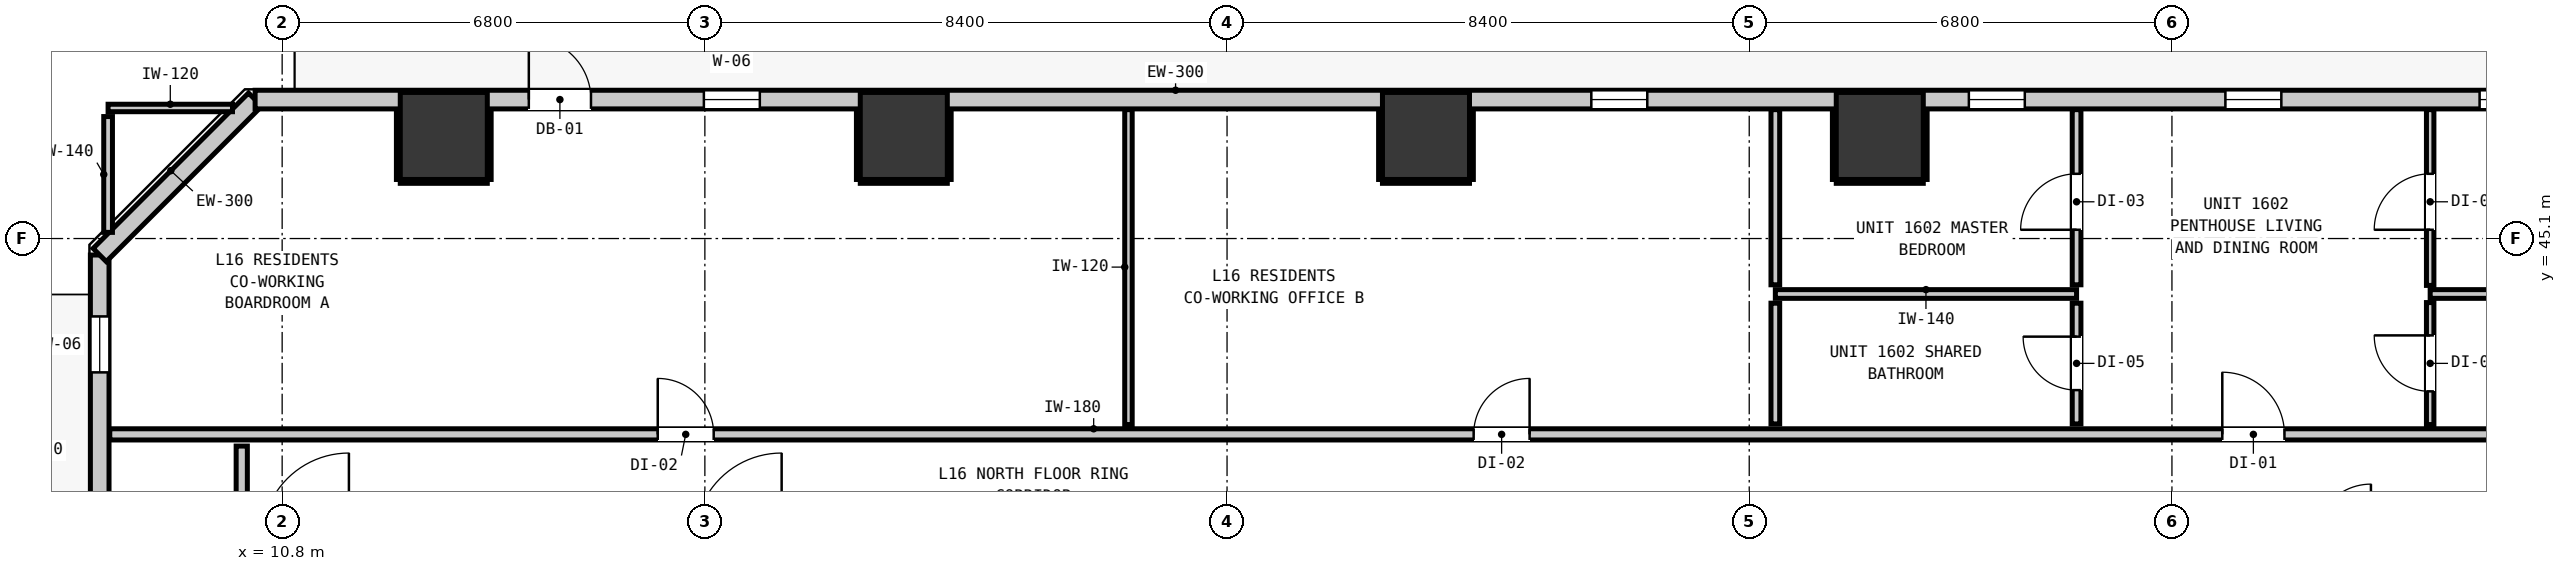
"""IFC4 building model, lengths in metres.
Left out: names, types, materials, properties, quantities, classifications, styles, units other than length and angle.
Written with IfcOpenShell. Run it as: python <this file> out.ifc"""

import sys

from ifc_helpers import new_model, si_unit, direction, frame, frame_2d, origin, origin_2d, place, context, subcontext, project, spatial, rectangle, extrude, element, fill, save


model = new_model("IFC4")
c1 = context("Model", 3, precision=1e-05, world=origin(), true_north=direction((0.0, 1.0)))
c2 = subcontext(c1, "Body", "Model", "MODEL_VIEW")
j1 = project(units=[si_unit("LENGTHUNIT", "METRE"), si_unit("PLANEANGLEUNIT", "RADIAN")], contexts=[c1])
p1 = place(None, origin())
s1 = spatial("IfcSite", under=j1, at=p1, CompositionType="ELEMENT")
p2 = place(p1, origin())
s2 = spatial("IfcBuilding", under=s1, at=p2, CompositionType="ELEMENT")
p3 = place(p2, frame((0.0, 0.0, 58.52)))
s3 = spatial("IfcBuildingStorey", under=s2, at=p3, CompositionType="ELEMENT", Elevation=58.52)
for number, where, z_axis, x_axis in (
    (1, (13.4, 46.75, 0.0), (0.0, 0.0, 1.0), (1.0, 0.0, 0.0)),
    (2, (20.8, 46.75, 0.0), (0.0, 0.0, 1.0), (1.0, 0.0, 0.0)),
    (3, (29.2, 46.75, 0.0), (0.0, 0.0, 1.0), (1.0, 0.0, 0.0)),
    (4, (36.5, 46.75, 0.0), (0.0, 0.0, 1.0), (1.0, 0.0, 0.0)),
):
    element("IfcColumn", number, at=place(p3, frame(where, z_axis=z_axis, x_axis=x_axis)), inside=s3, PredefinedType="COLUMN", context=c2, shape_type="SweptSolid", body=[
        extrude(rectangle(XDim=1.4, YDim=1.4, at=origin_2d()), origin(), (0.0, 0.0, 1.0), 2.9),
    ])
p4 = place(p3, frame((7.865, 10.165, 0.0), z_axis=(0.0, 0.0, 1.0), x_axis=(0.0, 1.0, 0.0)))
e5 = element("IfcWall", 5, at=p4, inside=s3, PredefinedType="STANDARD", context=c2, shape_type="SweptSolid", body=[
    extrude(rectangle(XDim=34.67, YDim=0.3, at=frame_2d((17.335, 0.0))), origin(), (0.0, 0.0, 1.0), 2.9),
])
p5 = place(p4, frame((0.901, 0.0, 0.0)))
e6 = element("IfcOpeningElement", 6, at=p5, cuts=e5, PredefinedType="OPENING", context=c2, shape_type="SweptSolid", body=[
    extrude(rectangle(XDim=1.0, YDim=2.15, at=frame_2d((0.5, 1.075))), frame((0.0, 0.16, 0.0), z_axis=(0.0, -1.0, 0.0), x_axis=(1.0, 0.0, 0.0)), (0.0, 0.0, 1.0), 0.32),
])
p6 = place(p4, frame((32.782, 0.0, 0.85)))
e7 = element("IfcOpeningElement", 7, at=p6, cuts=e5, PredefinedType="OPENING", context=c2, shape_type="SweptSolid", body=[
    extrude(rectangle(XDim=0.9, YDim=1.5, at=frame_2d((0.45, 0.75))), frame((0.0, 0.16, 0.0), z_axis=(0.0, -1.0, 0.0), x_axis=(1.0, 0.0, 0.0)), (0.0, 0.0, 1.0), 0.32),
])
p7 = place(p3, frame((7.865, 44.835, 0.0), z_axis=(0.0, 0.0, 1.0), x_axis=(0.707106781187, 0.707106781187, 0.0)))
e8 = element("IfcWall", 8, at=p7, inside=s3, PredefinedType="STANDARD", context=c2, shape_type="SweptSolid", body=[
    extrude(rectangle(XDim=3.536, YDim=0.3, at=frame_2d((1.768, 0.0))), origin(), (0.0, 0.0, 1.0), 2.9),
])
p8 = place(p3, frame((10.365, 47.335, 0.0), z_axis=(0.0, 0.0, 1.0), x_axis=(1.0, 0.0, 0.0)))
e9 = element("IfcWall", 9, at=p8, inside=s3, PredefinedType="STANDARD", context=c2, shape_type="SweptSolid", body=[
    extrude(rectangle(XDim=37.47, YDim=0.3, at=frame_2d((18.735, 0.0))), origin(), (0.0, 0.0, 1.0), 2.9),
])
p9 = place(p8, frame((4.403, 0.0, 0.0)))
e10 = element("IfcOpeningElement", 10, at=p9, cuts=e9, PredefinedType="OPENING", context=c2, shape_type="SweptSolid", body=[
    extrude(rectangle(XDim=1.0, YDim=2.15, at=frame_2d((0.5, 1.075))), frame((0.0, 0.16, 0.0), z_axis=(0.0, -1.0, 0.0), x_axis=(1.0, 0.0, 0.0)), (0.0, 0.0, 1.0), 0.32),
])
p10 = place(p8, frame((7.219, 0.0, 0.85)))
e11 = element("IfcOpeningElement", 11, at=p10, cuts=e9, PredefinedType="OPENING", context=c2, shape_type="SweptSolid", body=[
    extrude(rectangle(XDim=0.9, YDim=1.5, at=frame_2d((0.45, 0.75))), frame((0.0, 0.16, 0.0), z_axis=(0.0, -1.0, 0.0), x_axis=(1.0, 0.0, 0.0)), (0.0, 0.0, 1.0), 0.32),
])
p11 = place(p8, frame((21.495, 0.0, 0.85)))
e12 = element("IfcOpeningElement", 12, at=p11, cuts=e9, PredefinedType="OPENING", context=c2, shape_type="SweptSolid", body=[
    extrude(rectangle(XDim=0.9, YDim=1.5, at=frame_2d((0.45, 0.75))), frame((0.0, 0.16, 0.0), z_axis=(0.0, -1.0, 0.0), x_axis=(1.0, 0.0, 0.0)), (0.0, 0.0, 1.0), 0.32),
])
p12 = place(p8, frame((31.695, 0.0, 0.85)))
e13 = element("IfcOpeningElement", 13, at=p12, cuts=e9, PredefinedType="OPENING", context=c2, shape_type="SweptSolid", body=[
    extrude(rectangle(XDim=0.9, YDim=1.5, at=frame_2d((0.45, 0.75))), frame((0.0, 0.16, 0.0), z_axis=(0.0, -1.0, 0.0), x_axis=(1.0, 0.0, 0.0)), (0.0, 0.0, 1.0), 0.32),
])
p13 = place(p8, frame((27.568, 0.0, 0.85)))
e14 = element("IfcOpeningElement", 14, at=p13, cuts=e9, PredefinedType="OPENING", context=c2, shape_type="SweptSolid", body=[
    extrude(rectangle(XDim=0.9, YDim=1.5, at=frame_2d((0.45, 0.75))), frame((0.0, 0.16, 0.0), z_axis=(0.0, -1.0, 0.0), x_axis=(1.0, 0.0, 0.0)), (0.0, 0.0, 1.0), 0.32),
])
p14 = place(p8, frame((35.784, 0.0, 0.85)))
e15 = element("IfcOpeningElement", 15, at=p14, cuts=e9, PredefinedType="OPENING", context=c2, shape_type="SweptSolid", body=[
    extrude(rectangle(XDim=0.9, YDim=1.5, at=frame_2d((0.45, 0.75))), frame((0.0, 0.16, 0.0), z_axis=(0.0, -1.0, 0.0), x_axis=(1.0, 0.0, 0.0)), (0.0, 0.0, 1.0), 0.32),
])
p15 = place(p3, frame((8.027, 41.95, 0.0), z_axis=(0.0, 0.0, 1.0), x_axis=(1.0, 0.0, 0.0)))
e16 = element("IfcWall", 16, at=p15, inside=s3, PredefinedType="PARTITIONING", context=c2, shape_type="SweptSolid", body=[
    extrude(rectangle(XDim=42.146, YDim=0.18, at=frame_2d((21.073, 0.0))), origin(), (0.0, 0.0, 1.0), 2.9),
])
p16 = place(p15, frame((8.815, 0.0, 0.0)))
e17 = element("IfcOpeningElement", 17, at=p16, cuts=e16, PredefinedType="OPENING", context=c2, shape_type="SweptSolid", body=[
    extrude(rectangle(XDim=0.9, YDim=2.1, at=frame_2d((0.45, 1.05))), frame((0.0, 0.1, 0.0), z_axis=(0.0, -1.0, 0.0), x_axis=(1.0, 0.0, 0.0)), (0.0, 0.0, 1.0), 0.2),
])
p17 = place(p15, frame((21.94, 0.0, 0.0)))
e18 = element("IfcOpeningElement", 18, at=p17, cuts=e16, PredefinedType="OPENING", context=c2, shape_type="SweptSolid", body=[
    extrude(rectangle(XDim=0.9, YDim=2.1, at=frame_2d((0.45, 1.05))), frame((0.0, 0.1, 0.0), z_axis=(0.0, -1.0, 0.0), x_axis=(1.0, 0.0, 0.0)), (0.0, 0.0, 1.0), 0.2),
])
p18 = place(p15, frame((33.983, 0.0, 0.0)))
e19 = element("IfcOpeningElement", 19, at=p18, cuts=e16, PredefinedType="OPENING", context=c2, shape_type="SweptSolid", body=[
    extrude(rectangle(XDim=1.0, YDim=2.15, at=frame_2d((0.5, 1.075))), frame((0.0, 0.1, 0.0), z_axis=(0.0, -1.0, 0.0), x_axis=(1.0, 0.0, 0.0)), (0.0, 0.0, 1.0), 0.2),
])
p19 = place(p3, frame((34.82, 44.208, 0.0), z_axis=(0.0, 0.0, 1.0), x_axis=(1.0, 0.0, 0.0)))
e20 = element("IfcWall", 20, at=p19, inside=s3, PredefinedType="PARTITIONING", context=c2, shape_type="SweptSolid", body=[
    extrude(rectangle(XDim=4.846, YDim=0.14, at=frame_2d((2.423, 0.0))), origin(), (0.0, 0.0, 1.0), 2.9),
])
p20 = place(p3, frame((45.354, 44.208, 0.0), z_axis=(0.0, 0.0, 1.0), x_axis=(1.0, 0.0, 0.0)))
e21 = element("IfcWall", 21, at=p20, inside=s3, PredefinedType="PARTITIONING", context=c2, shape_type="SweptSolid", body=[
    extrude(rectangle(XDim=4.819, YDim=0.14, at=frame_2d((2.41, 0.0))), origin(), (0.0, 0.0, 1.0), 2.9),
])
p21 = place(p3, frame((8.0, 47.2, 0.0), z_axis=(0.0, 0.0, 1.0), x_axis=(1.0, 0.0, 0.0)))
e22 = element("IfcWall", 22, at=p21, inside=s3, PredefinedType="PARTITIONING", context=c2, shape_type="SweptSolid", body=[
    extrude(rectangle(XDim=2.001, YDim=0.12, at=frame_2d((1.0, 0.0))), origin(), (0.0, 0.0, 1.0), 2.9),
])
p22 = place(p3, frame((10.15, 40.438, 0.0), z_axis=(0.0, 0.0, 1.0), x_axis=(0.0, 1.0, 0.0)))
e23 = element("IfcWall", 23, at=p22, inside=s3, PredefinedType="PARTITIONING", context=c2, shape_type="SweptSolid", body=[
    extrude(rectangle(XDim=1.324, YDim=0.18, at=frame_2d((0.662, 0.0))), origin(), (0.0, 0.0, 1.0), 2.9),
])
p23 = place(p3, frame((8.0, 45.199, 0.0), z_axis=(0.0, 0.0, 1.0), x_axis=(0.0, 1.0, 0.0)))
e24 = element("IfcWall", 24, at=p23, inside=s3, PredefinedType="PARTITIONING", context=c2, shape_type="SweptSolid", body=[
    extrude(rectangle(XDim=1.863, YDim=0.14, at=frame_2d((0.932, 0.0))), origin(), (0.0, 0.0, 1.0), 2.9),
])
p24 = place(p3, frame((34.82, 42.118, 0.0), z_axis=(0.0, 0.0, 1.0), x_axis=(0.0, 1.0, 0.0)))
e25 = element("IfcWall", 25, at=p24, inside=s3, PredefinedType="PARTITIONING", context=c2, shape_type="SweptSolid", body=[
    extrude(rectangle(XDim=1.942, YDim=0.14, at=frame_2d((0.971, 0.0))), origin(), (0.0, 0.0, 1.0), 2.9),
])
p25 = place(p3, frame((34.82, 44.356, 0.0), z_axis=(0.0, 0.0, 1.0), x_axis=(0.0, 1.0, 0.0)))
e26 = element("IfcWall", 26, at=p25, inside=s3, PredefinedType="PARTITIONING", context=c2, shape_type="SweptSolid", body=[
    extrude(rectangle(XDim=2.817, YDim=0.14, at=frame_2d((1.409, 0.0))), origin(), (0.0, 0.0, 1.0), 2.9),
])
p26 = place(p3, frame((39.666, 42.118, 0.0), z_axis=(0.0, 0.0, 1.0), x_axis=(0.0, 1.0, 0.0)))
e27 = element("IfcWall", 27, at=p26, inside=s3, PredefinedType="PARTITIONING", context=c2, shape_type="SweptSolid", body=[
    extrude(rectangle(XDim=1.942, YDim=0.14, at=frame_2d((0.971, 0.0))), origin(), (0.0, 0.0, 1.0), 2.9),
])
p27 = place(p26, frame((0.544, 0.0, 0.0)))
e28 = element("IfcOpeningElement", 28, at=p27, cuts=e27, PredefinedType="OPENING", context=c2, shape_type="SweptSolid", body=[
    extrude(rectangle(XDim=0.86, YDim=2.02, at=frame_2d((0.43, 1.01))), frame((0.0, 0.08, 0.0), z_axis=(0.0, -1.0, 0.0), x_axis=(1.0, 0.0, 0.0)), (0.0, 0.0, 1.0), 0.16),
])
p28 = place(p3, frame((39.666, 44.356, 0.0), z_axis=(0.0, 0.0, 1.0), x_axis=(0.0, 1.0, 0.0)))
e29 = element("IfcWall", 29, at=p28, inside=s3, PredefinedType="PARTITIONING", context=c2, shape_type="SweptSolid", body=[
    extrude(rectangle(XDim=2.817, YDim=0.14, at=frame_2d((1.409, 0.0))), origin(), (0.0, 0.0, 1.0), 2.9),
])
p29 = place(p28, frame((0.885, 0.0, 0.0)))
e30 = element("IfcOpeningElement", 30, at=p29, cuts=e29, PredefinedType="OPENING", context=c2, shape_type="SweptSolid", body=[
    extrude(rectangle(XDim=0.9, YDim=2.1, at=frame_2d((0.45, 1.05))), frame((0.0, 0.08, 0.0), z_axis=(0.0, -1.0, 0.0), x_axis=(1.0, 0.0, 0.0)), (0.0, 0.0, 1.0), 0.16),
])
p30 = place(p3, frame((24.414, 42.108, 0.0), z_axis=(0.0, 0.0, 1.0), x_axis=(0.0, 1.0, 0.0)))
e31 = element("IfcWall", 31, at=p30, inside=s3, PredefinedType="PARTITIONING", context=c2, shape_type="SweptSolid", body=[
    extrude(rectangle(XDim=5.065, YDim=0.12, at=frame_2d((2.533, 0.0))), origin(), (0.0, 0.0, 1.0), 2.9),
])
p31 = place(p3, frame((45.354, 42.108, 0.0), z_axis=(0.0, 0.0, 1.0), x_axis=(0.0, 1.0, 0.0)))
e32 = element("IfcWall", 32, at=p31, inside=s3, PredefinedType="PARTITIONING", context=c2, shape_type="SweptSolid", body=[
    extrude(rectangle(XDim=1.962, YDim=0.12, at=frame_2d((0.981, 0.0))), origin(), (0.0, 0.0, 1.0), 2.9),
])
p32 = place(p31, frame((0.534, 0.0, 0.0)))
e33 = element("IfcOpeningElement", 33, at=p32, cuts=e32, PredefinedType="OPENING", context=c2, shape_type="SweptSolid", body=[
    extrude(rectangle(XDim=0.9, YDim=2.1, at=frame_2d((0.45, 1.05))), frame((0.0, 0.07, 0.0), z_axis=(0.0, -1.0, 0.0), x_axis=(1.0, 0.0, 0.0)), (0.0, 0.0, 1.0), 0.14),
])
p33 = place(p3, frame((45.354, 44.346, 0.0), z_axis=(0.0, 0.0, 1.0), x_axis=(0.0, 1.0, 0.0)))
e34 = element("IfcWall", 34, at=p33, inside=s3, PredefinedType="PARTITIONING", context=c2, shape_type="SweptSolid", body=[
    extrude(rectangle(XDim=2.827, YDim=0.12, at=frame_2d((1.414, 0.0))), origin(), (0.0, 0.0, 1.0), 2.9),
])
p34 = place(p33, frame((0.895, 0.0, 0.0)))
e35 = element("IfcOpeningElement", 35, at=p34, cuts=e34, PredefinedType="OPENING", context=c2, shape_type="SweptSolid", body=[
    extrude(rectangle(XDim=0.9, YDim=2.1, at=frame_2d((0.45, 1.05))), frame((0.0, 0.07, 0.0), z_axis=(0.0, -1.0, 0.0), x_axis=(1.0, 0.0, 0.0)), (0.0, 0.0, 1.0), 0.14),
])
p35 = place(p3, frame((12.7, 46.018, 0.0), z_axis=(0.0, 0.0, 1.0), x_axis=(1.0, 0.0, 0.0)))
e36 = element("IfcWall", 36, at=p35, inside=s3, PredefinedType="PARTITIONING", context=c2, shape_type="SweptSolid", body=[
    extrude(rectangle(XDim=1.4, YDim=0.06, at=frame_2d((0.7, 0.0))), origin(), (0.0, 0.0, 1.0), 1.45),
])
for number, where, z_axis, x_axis in (
    (37, (12.668, 46.05, 0.0), (0.0, 0.0, 1.0), (0.0, 1.0, 0.0)),
    (38, (14.132, 46.05, 0.0), (0.0, 0.0, 1.0), (0.0, 1.0, 0.0)),
):
    element("IfcWall", number, at=place(p3, frame(where, z_axis=z_axis, x_axis=x_axis)), inside=s3, PredefinedType="PARTITIONING", context=c2, shape_type="SweptSolid", body=[
        extrude(rectangle(XDim=1.12, YDim=0.06, at=frame_2d((0.56, 0.0))), origin(), (0.0, 0.0, 1.0), 1.45),
    ])
p36 = place(p3, frame((20.1, 46.018, 0.0), z_axis=(0.0, 0.0, 1.0), x_axis=(1.0, 0.0, 0.0)))
e39 = element("IfcWall", 39, at=p36, inside=s3, PredefinedType="PARTITIONING", context=c2, shape_type="SweptSolid", body=[
    extrude(rectangle(XDim=1.4, YDim=0.06, at=frame_2d((0.7, 0.0))), origin(), (0.0, 0.0, 1.0), 1.45),
])
for number, where, z_axis, x_axis in (
    (40, (20.068, 46.05, 0.0), (0.0, 0.0, 1.0), (0.0, 1.0, 0.0)),
    (41, (21.532, 46.05, 0.0), (0.0, 0.0, 1.0), (0.0, 1.0, 0.0)),
):
    element("IfcWall", number, at=place(p3, frame(where, z_axis=z_axis, x_axis=x_axis)), inside=s3, PredefinedType="PARTITIONING", context=c2, shape_type="SweptSolid", body=[
        extrude(rectangle(XDim=1.12, YDim=0.06, at=frame_2d((0.56, 0.0))), origin(), (0.0, 0.0, 1.0), 1.45),
    ])
p37 = place(p3, frame((28.5, 46.018, 0.0), z_axis=(0.0, 0.0, 1.0), x_axis=(1.0, 0.0, 0.0)))
e42 = element("IfcWall", 42, at=p37, inside=s3, PredefinedType="PARTITIONING", context=c2, shape_type="SweptSolid", body=[
    extrude(rectangle(XDim=1.4, YDim=0.06, at=frame_2d((0.7, 0.0))), origin(), (0.0, 0.0, 1.0), 1.45),
])
for number, where, z_axis, x_axis in (
    (43, (28.468, 46.05, 0.0), (0.0, 0.0, 1.0), (0.0, 1.0, 0.0)),
    (44, (29.932, 46.05, 0.0), (0.0, 0.0, 1.0), (0.0, 1.0, 0.0)),
):
    element("IfcWall", number, at=place(p3, frame(where, z_axis=z_axis, x_axis=x_axis)), inside=s3, PredefinedType="PARTITIONING", context=c2, shape_type="SweptSolid", body=[
        extrude(rectangle(XDim=1.12, YDim=0.06, at=frame_2d((0.56, 0.0))), origin(), (0.0, 0.0, 1.0), 1.45),
    ])
p38 = place(p3, frame((35.8, 46.018, 0.0), z_axis=(0.0, 0.0, 1.0), x_axis=(1.0, 0.0, 0.0)))
e45 = element("IfcWall", 45, at=p38, inside=s3, PredefinedType="PARTITIONING", context=c2, shape_type="SweptSolid", body=[
    extrude(rectangle(XDim=1.4, YDim=0.06, at=frame_2d((0.7, 0.0))), origin(), (0.0, 0.0, 1.0), 1.45),
])
for number, where, z_axis, x_axis in (
    (46, (35.768, 46.05, 0.0), (0.0, 0.0, 1.0), (0.0, 1.0, 0.0)),
    (47, (37.232, 46.05, 0.0), (0.0, 0.0, 1.0), (0.0, 1.0, 0.0)),
):
    element("IfcWall", number, at=place(p3, frame(where, z_axis=z_axis, x_axis=x_axis)), inside=s3, PredefinedType="PARTITIONING", context=c2, shape_type="SweptSolid", body=[
        extrude(rectangle(XDim=1.12, YDim=0.06, at=frame_2d((0.56, 0.0))), origin(), (0.0, 0.0, 1.0), 1.45),
    ])
p39 = place(p9, origin())
e48 = element("IfcDoor", 48, at=p39, inside=s3, OperationType="SINGLE_SWING_LEFT", PredefinedType="DOOR", context=c2, shape_type="SweptSolid", body=[
    extrude(rectangle(XDim=1.0, YDim=2.15, at=frame_2d((0.5, 1.075))), frame((0.0, 0.025, 0.0), z_axis=(0.0, -1.0, 0.0), x_axis=(1.0, 0.0, 0.0)), (0.0, 0.0, 1.0), 0.05),
])
fill(e10, e48)
p40 = place(p6, origin())
e49 = element("IfcWindow", 49, at=p40, inside=s3, PartitioningType="SINGLE_PANEL", PredefinedType="WINDOW", context=c2, shape_type="SweptSolid", body=[
    extrude(rectangle(XDim=0.9, YDim=1.5, at=frame_2d((0.45, 0.75))), frame((0.0, 0.03, 0.0), z_axis=(0.0, -1.0, 0.0), x_axis=(1.0, 0.0, 0.0)), (0.0, 0.0, 1.0), 0.06),
])
fill(e7, e49)
p41 = place(p10, origin())
e50 = element("IfcWindow", 50, at=p41, inside=s3, PartitioningType="SINGLE_PANEL", PredefinedType="WINDOW", context=c2, shape_type="SweptSolid", body=[
    extrude(rectangle(XDim=0.9, YDim=1.5, at=frame_2d((0.45, 0.75))), frame((0.0, 0.03, 0.0), z_axis=(0.0, -1.0, 0.0), x_axis=(1.0, 0.0, 0.0)), (0.0, 0.0, 1.0), 0.06),
])
fill(e11, e50)
p42 = place(p11, origin())
e51 = element("IfcWindow", 51, at=p42, inside=s3, PartitioningType="SINGLE_PANEL", PredefinedType="WINDOW", context=c2, shape_type="SweptSolid", body=[
    extrude(rectangle(XDim=0.9, YDim=1.5, at=frame_2d((0.45, 0.75))), frame((0.0, 0.03, 0.0), z_axis=(0.0, -1.0, 0.0), x_axis=(1.0, 0.0, 0.0)), (0.0, 0.0, 1.0), 0.06),
])
fill(e12, e51)
p43 = place(p12, origin())
e52 = element("IfcWindow", 52, at=p43, inside=s3, PartitioningType="SINGLE_PANEL", PredefinedType="WINDOW", context=c2, shape_type="SweptSolid", body=[
    extrude(rectangle(XDim=0.9, YDim=1.5, at=frame_2d((0.45, 0.75))), frame((0.0, 0.03, 0.0), z_axis=(0.0, -1.0, 0.0), x_axis=(1.0, 0.0, 0.0)), (0.0, 0.0, 1.0), 0.06),
])
fill(e13, e52)
p44 = place(p13, origin())
e53 = element("IfcWindow", 53, at=p44, inside=s3, PartitioningType="SINGLE_PANEL", PredefinedType="WINDOW", context=c2, shape_type="SweptSolid", body=[
    extrude(rectangle(XDim=0.9, YDim=1.5, at=frame_2d((0.45, 0.75))), frame((0.0, 0.03, 0.0), z_axis=(0.0, -1.0, 0.0), x_axis=(1.0, 0.0, 0.0)), (0.0, 0.0, 1.0), 0.06),
])
fill(e14, e53)
p45 = place(p14, origin())
e54 = element("IfcWindow", 54, at=p45, inside=s3, PartitioningType="SINGLE_PANEL", PredefinedType="WINDOW", context=c2, shape_type="SweptSolid", body=[
    extrude(rectangle(XDim=0.9, YDim=1.5, at=frame_2d((0.45, 0.75))), frame((0.0, 0.03, 0.0), z_axis=(0.0, -1.0, 0.0), x_axis=(1.0, 0.0, 0.0)), (0.0, 0.0, 1.0), 0.06),
])
fill(e15, e54)
p46 = place(p16, origin())
e55 = element("IfcDoor", 55, at=p46, inside=s3, OperationType="SINGLE_SWING_LEFT", PredefinedType="DOOR", context=c2, shape_type="SweptSolid", body=[
    extrude(rectangle(XDim=0.9, YDim=2.1, at=frame_2d((0.45, 1.05))), frame((0.0, 0.025, 0.0), z_axis=(0.0, -1.0, 0.0), x_axis=(1.0, 0.0, 0.0)), (0.0, 0.0, 1.0), 0.05),
])
fill(e17, e55)
p47 = place(p17, origin())
e56 = element("IfcDoor", 56, at=p47, inside=s3, OperationType="SINGLE_SWING_RIGHT", PredefinedType="DOOR", context=c2, shape_type="SweptSolid", body=[
    extrude(rectangle(XDim=0.9, YDim=2.1, at=frame_2d((0.45, 1.05))), frame((0.0, 0.025, 0.0), z_axis=(0.0, -1.0, 0.0), x_axis=(1.0, 0.0, 0.0)), (0.0, 0.0, 1.0), 0.05),
])
fill(e18, e56)
p48 = place(p18, origin())
e57 = element("IfcDoor", 57, at=p48, inside=s3, OperationType="SINGLE_SWING_LEFT", PredefinedType="DOOR", context=c2, shape_type="SweptSolid", body=[
    extrude(rectangle(XDim=1.0, YDim=2.15, at=frame_2d((0.5, 1.075))), frame((0.0, 0.025, 0.0), z_axis=(0.0, -1.0, 0.0), x_axis=(1.0, 0.0, 0.0)), (0.0, 0.0, 1.0), 0.05),
])
fill(e19, e57)
p49 = place(p27, origin())
e58 = element("IfcDoor", 58, at=p49, inside=s3, OperationType="SINGLE_SWING_RIGHT", PredefinedType="DOOR", context=c2, shape_type="SweptSolid", body=[
    extrude(rectangle(XDim=0.86, YDim=2.02, at=frame_2d((0.43, 1.01))), frame((0.0, 0.025, 0.0), z_axis=(0.0, -1.0, 0.0), x_axis=(1.0, 0.0, 0.0)), (0.0, 0.0, 1.0), 0.05),
])
fill(e28, e58)
p50 = place(p29, origin())
e59 = element("IfcDoor", 59, at=p50, inside=s3, OperationType="SINGLE_SWING_LEFT", PredefinedType="DOOR", context=c2, shape_type="SweptSolid", body=[
    extrude(rectangle(XDim=0.9, YDim=2.1, at=frame_2d((0.45, 1.05))), frame((0.0, 0.025, 0.0), z_axis=(0.0, -1.0, 0.0), x_axis=(1.0, 0.0, 0.0)), (0.0, 0.0, 1.0), 0.05),
])
fill(e30, e59)
p51 = place(p32, origin())
e60 = element("IfcDoor", 60, at=p51, inside=s3, OperationType="SINGLE_SWING_RIGHT", PredefinedType="DOOR", context=c2, shape_type="SweptSolid", body=[
    extrude(rectangle(XDim=0.9, YDim=2.1, at=frame_2d((0.45, 1.05))), frame((0.0, 0.025, 0.0), z_axis=(0.0, -1.0, 0.0), x_axis=(1.0, 0.0, 0.0)), (0.0, 0.0, 1.0), 0.05),
])
fill(e33, e60)
p52 = place(p34, origin())
e61 = element("IfcDoor", 61, at=p52, inside=s3, OperationType="SINGLE_SWING_LEFT", PredefinedType="DOOR", context=c2, shape_type="SweptSolid", body=[
    extrude(rectangle(XDim=0.9, YDim=2.1, at=frame_2d((0.45, 1.05))), frame((0.0, 0.025, 0.0), z_axis=(0.0, -1.0, 0.0), x_axis=(1.0, 0.0, 0.0)), (0.0, 0.0, 1.0), 0.05),
])
fill(e35, e61)
save(model, sys.argv[1])
